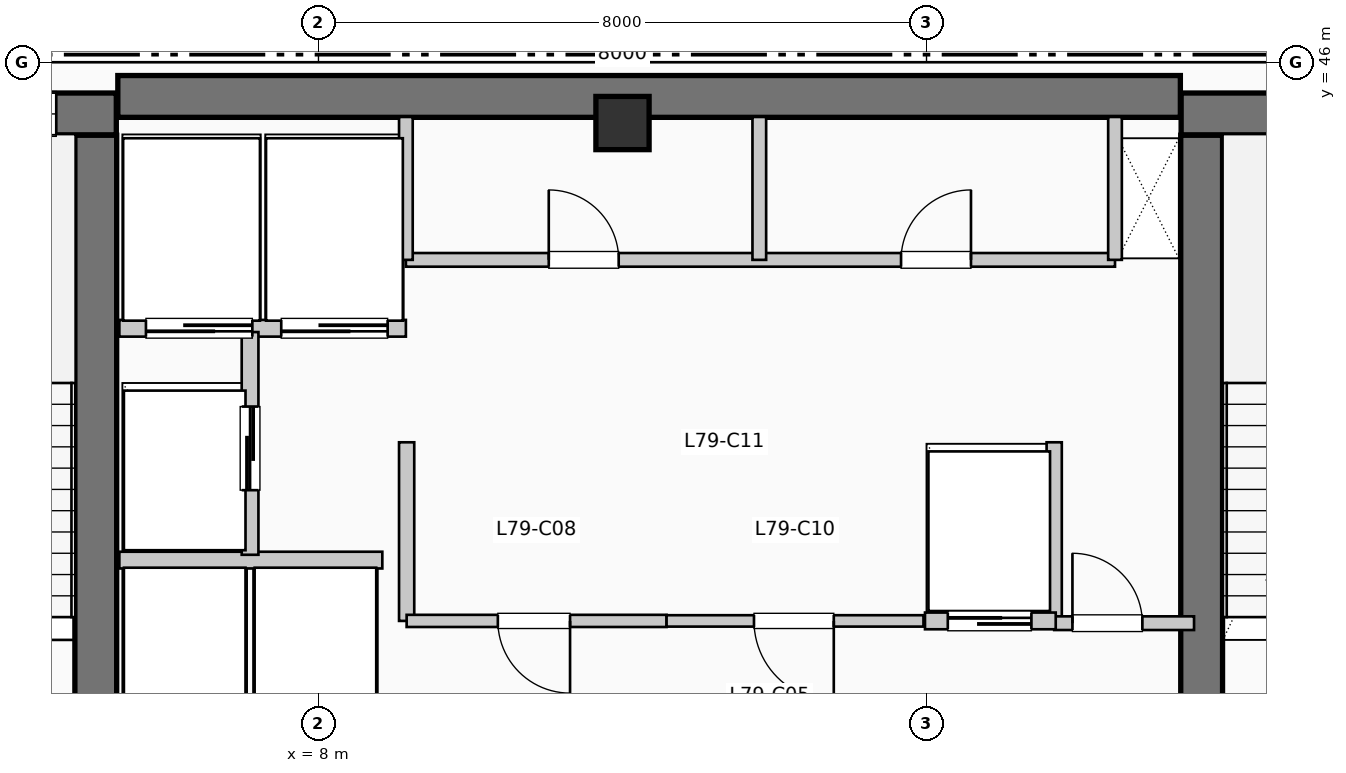
"""IFC4 building model, lengths in metres.
Left out: names, types, materials, properties, quantities, classifications, styles, units other than length and angle.
Written with IfcOpenShell. Run it as: python <this file> out.ifc"""

import sys

from ifc_helpers import new_model, si_unit, direction, frame, frame_2d, origin, origin_2d, place, context, subcontext, project, spatial, rectangle, extrude, element, fill, save


model = new_model("IFC4")
c1 = context("Model", 3, precision=1e-05, world=origin(), true_north=direction((0.0, 1.0)))
c2 = subcontext(c1, "Body", "Model", "MODEL_VIEW")
j1 = project(units=[si_unit("LENGTHUNIT", "METRE"), si_unit("PLANEANGLEUNIT", "RADIAN")], contexts=[c1])
p1 = place(None, origin())
s1 = spatial("IfcSite", under=j1, at=p1, CompositionType="ELEMENT")
p2 = place(p1, origin())
s2 = spatial("IfcBuilding", under=s1, at=p2, CompositionType="ELEMENT")
p3 = place(p2, frame((0.0, 0.0, 323.73)))
s3 = spatial("IfcBuildingStorey", under=s2, at=p3, CompositionType="ELEMENT", Elevation=323.73)
p4 = place(p3, frame((5.36, 45.55, 0.0), z_axis=(0.0, 0.0, 1.0), x_axis=(1.0, 0.0, 0.0)))
e1 = element("IfcWall", 1, at=p4, inside=s3, PredefinedType="SHEAR", context=c2, shape_type="SweptSolid", body=[
    extrude(rectangle(XDim=13.98, YDim=0.55, at=frame_2d((6.99, 0.0))), origin(), (0.0, 0.0, 1.0), 3.96),
])
p5 = place(p3, frame((5.07, 37.15, 0.0), z_axis=(0.0, 0.0, 1.0), x_axis=(0.0, 1.0, 0.0)))
e2 = element("IfcWall", 2, at=p5, inside=s3, PredefinedType="SHEAR", context=c2, shape_type="SweptSolid", body=[
    extrude(rectangle(XDim=7.89, YDim=0.55, at=frame_2d((3.945, 0.0))), origin(), (0.0, 0.0, 1.0), 3.96),
])
p6 = place(p3, frame((1.1, 45.32, 0.0), z_axis=(0.0, 0.0, 1.0), x_axis=(1.0, 0.0, 0.0)))
e3 = element("IfcWall", 3, at=p6, inside=s3, PredefinedType="SHEAR", context=c2, shape_type="SweptSolid", body=[
    extrude(rectangle(XDim=4.24, YDim=0.55, at=frame_2d((2.12, 0.0))), origin(), (0.0, 0.0, 1.0), 3.96),
])
p7 = place(p6, frame((2.05, 0.0, 1.05)))
e4 = element("IfcOpeningElement", 4, at=p7, cuts=e3, PredefinedType="OPENING", context=c2, shape_type="SweptSolid", body=[
    extrude(rectangle(XDim=1.4, YDim=1.8, at=frame_2d((0.7, 0.9))), frame((0.0, 0.285, 0.0), z_axis=(0.0, -1.0, 0.0), x_axis=(1.0, 0.0, 0.0)), (0.0, 0.0, 1.0), 0.57),
])
p8 = place(p3, frame((19.62, 37.15, 0.0), z_axis=(0.0, 0.0, 1.0), x_axis=(0.0, 1.0, 0.0)))
e5 = element("IfcWall", 5, at=p8, inside=s3, PredefinedType="SHEAR", context=c2, shape_type="SweptSolid", body=[
    extrude(rectangle(XDim=7.89, YDim=0.55, at=frame_2d((3.945, 0.0))), origin(), (0.0, 0.0, 1.0), 3.96),
])
p9 = place(p3, frame((19.35, 45.32, 0.0), z_axis=(0.0, 0.0, 1.0), x_axis=(1.0, 0.0, 0.0)))
e6 = element("IfcWall", 6, at=p9, inside=s3, PredefinedType="SHEAR", context=c2, shape_type="SweptSolid", body=[
    extrude(rectangle(XDim=3.69, YDim=0.55, at=frame_2d((1.845, 0.0))), origin(), (0.0, 0.0, 1.0), 3.96),
])
p10 = place(p9, frame((1.15, 0.0, 1.05)))
e7 = element("IfcOpeningElement", 7, at=p10, cuts=e6, PredefinedType="OPENING", context=c2, shape_type="SweptSolid", body=[
    extrude(rectangle(XDim=1.4, YDim=1.8, at=frame_2d((0.7, 0.9))), frame((0.0, 0.285, 0.0), z_axis=(0.0, -1.0, 0.0), x_axis=(1.0, 0.0, 0.0)), (0.0, 0.0, 1.0), 0.57),
])
p11 = place(p3, frame((12.0, 45.2, 0.0), z_axis=(0.0, 0.0, 1.0), x_axis=(1.0, 0.0, 0.0)))
e8 = element("IfcColumn", 8, at=p11, inside=s3, PredefinedType="COLUMN", context=c2, shape_type="SweptSolid", body=[
    extrude(rectangle(XDim=0.7, YDim=0.7, at=origin_2d()), origin(), (0.0, 0.0, 1.0), 3.96),
])
p12 = place(p3, frame((5.38, 39.45, 0.0), z_axis=(0.0, 0.0, 1.0), x_axis=(1.0, 0.0, 0.0)))
e9 = element("IfcWall", 9, at=p12, inside=s3, PredefinedType="PARTITIONING", context=c2, shape_type="SweptSolid", body=[
    extrude(rectangle(XDim=3.46, YDim=0.22, at=frame_2d((1.73, 0.0))), origin(), (0.0, 0.0, 1.0), 3.74),
])
p13 = place(p3, frame((5.38, 42.5, 0.0), z_axis=(0.0, 0.0, 1.0), x_axis=(1.0, 0.0, 0.0)))
e10 = element("IfcWall", 10, at=p13, inside=s3, PredefinedType="PARTITIONING", context=c2, shape_type="SweptSolid", body=[
    extrude(rectangle(XDim=3.77, YDim=0.22, at=frame_2d((1.885, 0.0))), origin(), (0.0, 0.0, 1.0), 3.74),
])
p14 = place(p13, frame((1.75, 0.0, 0.0), z_axis=(0.0, 0.0, 1.0), x_axis=(-1.0, 0.0, 0.0)))
e11 = element("IfcOpeningElement", 11, at=p14, cuts=e10, PredefinedType="OPENING", context=c2, shape_type="SweptSolid", body=[
    extrude(rectangle(XDim=1.4, YDim=2.2, at=frame_2d((0.7, 1.1))), frame((0.0, 0.12, 0.0), z_axis=(0.0, -1.0, 0.0), x_axis=(1.0, 0.0, 0.0)), (0.0, 0.0, 1.0), 0.24),
])
p15 = place(p13, frame((3.53, 0.0, 0.0), z_axis=(0.0, 0.0, 1.0), x_axis=(-1.0, 0.0, 0.0)))
e12 = element("IfcOpeningElement", 12, at=p15, cuts=e10, PredefinedType="OPENING", context=c2, shape_type="SweptSolid", body=[
    extrude(rectangle(XDim=1.4, YDim=2.2, at=frame_2d((0.7, 1.1))), frame((0.0, 0.12, 0.0), z_axis=(0.0, -1.0, 0.0), x_axis=(1.0, 0.0, 0.0)), (0.0, 0.0, 1.0), 0.24),
])
p16 = place(p3, frame((7.1, 39.52, 0.0), z_axis=(0.0, 0.0, 1.0), x_axis=(0.0, 1.0, 0.0)))
e13 = element("IfcWall", 13, at=p16, inside=s3, PredefinedType="PARTITIONING", context=c2, shape_type="SweptSolid", body=[
    extrude(rectangle(XDim=2.93, YDim=0.22, at=frame_2d((1.465, 0.0))), origin(), (0.0, 0.0, 1.0), 3.74),
])
p17 = place(p16, frame((0.85, 0.0, 0.0)))
e14 = element("IfcOpeningElement", 14, at=p17, cuts=e13, PredefinedType="OPENING", context=c2, shape_type="SweptSolid", body=[
    extrude(rectangle(XDim=1.1, YDim=2.2, at=frame_2d((0.55, 1.1))), frame((0.0, 0.12, 0.0), z_axis=(0.0, -1.0, 0.0), x_axis=(1.0, 0.0, 0.0)), (0.0, 0.0, 1.0), 0.24),
])
for number, where, z_axis, x_axis in (
    (15, (9.16, 38.65, 0.0), (0.0, 0.0, 1.0), (0.0, 1.0, 0.0)),
    (16, (17.68, 38.65, 0.0), (0.0, 0.0, 1.0), (0.0, 1.0, 0.0)),
):
    element("IfcWall", number, at=place(p3, frame(where, z_axis=z_axis, x_axis=x_axis)), inside=s3, PredefinedType="PARTITIONING", context=c2, shape_type="SweptSolid", body=[
        extrude(rectangle(XDim=2.35, YDim=0.2, at=frame_2d((1.175, 0.0))), origin(), (0.0, 0.0, 1.0), 3.74),
    ])
p18 = place(p3, frame((17.68, 38.62, 0.0), z_axis=(0.0, 0.0, 1.0), x_axis=(1.0, 0.0, 0.0)))
e17 = element("IfcWall", 17, at=p18, inside=s3, PredefinedType="PARTITIONING", context=c2, shape_type="SweptSolid", body=[
    extrude(rectangle(XDim=1.84, YDim=0.18, at=frame_2d((0.92, 0.0))), origin(), (0.0, 0.0, 1.0), 3.74),
])
p19 = place(p18, frame((0.24, 0.0, 0.0)))
e18 = element("IfcOpeningElement", 18, at=p19, cuts=e17, PredefinedType="OPENING", context=c2, shape_type="SweptSolid", body=[
    extrude(rectangle(XDim=0.92, YDim=2.1, at=frame_2d((0.46, 1.05))), frame((0.0, 0.1, 0.0), z_axis=(0.0, -1.0, 0.0), x_axis=(1.0, 0.0, 0.0)), (0.0, 0.0, 1.0), 0.2),
])
p20 = place(p3, frame((9.16, 38.65, 0.0), z_axis=(0.0, 0.0, 1.0), x_axis=(1.0, 0.0, 0.0)))
e19 = element("IfcWall", 19, at=p20, inside=s3, PredefinedType="PARTITIONING", context=c2, shape_type="SweptSolid", body=[
    extrude(rectangle(XDim=3.42, YDim=0.16, at=frame_2d((1.71, 0.0))), origin(), (0.0, 0.0, 1.0), 3.74),
])
p21 = place(p20, frame((2.15, 0.0, 0.0), z_axis=(0.0, 0.0, 1.0), x_axis=(-1.0, 0.0, 0.0)))
e20 = element("IfcOpeningElement", 20, at=p21, cuts=e19, PredefinedType="OPENING", context=c2, shape_type="SweptSolid", body=[
    extrude(rectangle(XDim=0.95, YDim=2.15, at=frame_2d((0.475, 1.075))), frame((0.0, 0.09, 0.0), z_axis=(0.0, -1.0, 0.0), x_axis=(1.0, 0.0, 0.0)), (0.0, 0.0, 1.0), 0.18),
])
p22 = place(p3, frame((12.58, 38.65, 0.0), z_axis=(0.0, 0.0, 1.0), x_axis=(1.0, 0.0, 0.0)))
e21 = element("IfcWall", 21, at=p22, inside=s3, PredefinedType="PARTITIONING", context=c2, shape_type="SweptSolid", body=[
    extrude(rectangle(XDim=3.38, YDim=0.15, at=frame_2d((1.69, 0.0))), origin(), (0.0, 0.0, 1.0), 3.74),
])
p23 = place(p22, frame((2.2, 0.0, 0.0), z_axis=(0.0, 0.0, 1.0), x_axis=(-1.0, 0.0, 0.0)))
e22 = element("IfcOpeningElement", 22, at=p23, cuts=e21, PredefinedType="OPENING", context=c2, shape_type="SweptSolid", body=[
    extrude(rectangle(XDim=1.05, YDim=2.15, at=frame_2d((0.525, 1.075))), frame((0.0, 0.085, 0.0), z_axis=(0.0, -1.0, 0.0), x_axis=(1.0, 0.0, 0.0)), (0.0, 0.0, 1.0), 0.17),
])
p24 = place(p3, frame((15.98, 38.65, 0.0), z_axis=(0.0, 0.0, 1.0), x_axis=(1.0, 0.0, 0.0)))
e23 = element("IfcWall", 23, at=p24, inside=s3, PredefinedType="PARTITIONING", context=c2, shape_type="SweptSolid", body=[
    extrude(rectangle(XDim=1.72, YDim=0.22, at=frame_2d((0.86, 0.0))), origin(), (0.0, 0.0, 1.0), 3.74),
])
p25 = place(p24, frame((0.3, 0.0, 0.0)))
e24 = element("IfcOpeningElement", 24, at=p25, cuts=e23, PredefinedType="OPENING", context=c2, shape_type="SweptSolid", body=[
    extrude(rectangle(XDim=1.1, YDim=2.2, at=frame_2d((0.55, 1.1))), frame((0.0, 0.12, 0.0), z_axis=(0.0, -1.0, 0.0), x_axis=(1.0, 0.0, 0.0)), (0.0, 0.0, 1.0), 0.24),
])
p26 = place(p3, frame((9.15, 43.4, 0.0), z_axis=(0.0, 0.0, 1.0), x_axis=(1.0, 0.0, 0.0)))
e25 = element("IfcWall", 25, at=p26, inside=s3, PredefinedType="PLUMBINGWALL", context=c2, shape_type="SweptSolid", body=[
    extrude(rectangle(XDim=9.33, YDim=0.18, at=frame_2d((4.665, 0.0))), origin(), (0.0, 0.0, 1.0), 3.74),
])
p27 = place(p26, frame((1.88, 0.0, 0.0)))
e26 = element("IfcOpeningElement", 26, at=p27, cuts=e25, PredefinedType="OPENING", context=c2, shape_type="SweptSolid", body=[
    extrude(rectangle(XDim=0.92, YDim=2.1, at=frame_2d((0.46, 1.05))), frame((0.0, 0.1, 0.0), z_axis=(0.0, -1.0, 0.0), x_axis=(1.0, 0.0, 0.0)), (0.0, 0.0, 1.0), 0.2),
])
p28 = place(p26, frame((6.515, 0.0, 0.0)))
e27 = element("IfcOpeningElement", 27, at=p28, cuts=e25, PredefinedType="OPENING", context=c2, shape_type="SweptSolid", body=[
    extrude(rectangle(XDim=0.92, YDim=2.1, at=frame_2d((0.46, 1.05))), frame((0.0, 0.1, 0.0), z_axis=(0.0, -1.0, 0.0), x_axis=(1.0, 0.0, 0.0)), (0.0, 0.0, 1.0), 0.2),
])
for number, where, z_axis, x_axis in (
    (28, (9.15, 43.4, 0.0), (0.0, 0.0, 1.0), (0.0, 1.0, 0.0)),
    (29, (18.48, 43.4, 0.0), (0.0, 0.0, 1.0), (0.0, 1.0, 0.0)),
    (30, (13.8, 43.4, 0.0), (0.0, 0.0, 1.0), (0.0, 1.0, 0.0)),
):
    element("IfcWall", number, at=place(p3, frame(where, z_axis=z_axis, x_axis=x_axis)), inside=s3, PredefinedType="PLUMBINGWALL", context=c2, shape_type="SweptSolid", body=[
        extrude(rectangle(XDim=1.88, YDim=0.18, at=frame_2d((0.94, 0.0))), origin(), (0.0, 0.0, 1.0), 3.74),
    ])
p29 = place(p7, origin())
e31 = element("IfcWindow", 31, at=p29, inside=s3, PartitioningType="SINGLE_PANEL", PredefinedType="WINDOW", context=c2, shape_type="SweptSolid", body=[
    extrude(rectangle(XDim=1.4, YDim=1.8, at=frame_2d((0.7, 0.9))), frame((0.0, 0.03, 0.0), z_axis=(0.0, -1.0, 0.0), x_axis=(1.0, 0.0, 0.0)), (0.0, 0.0, 1.0), 0.06),
])
fill(e4, e31)
p30 = place(p14, origin())
e32 = element("IfcDoor", 32, at=p30, inside=s3, OperationType="SLIDING_TO_LEFT", PredefinedType="DOOR", context=c2, shape_type="SweptSolid", body=[
    extrude(rectangle(XDim=1.4, YDim=2.2, at=frame_2d((0.7, 1.1))), frame((0.0, 0.025, 0.0), z_axis=(0.0, -1.0, 0.0), x_axis=(1.0, 0.0, 0.0)), (0.0, 0.0, 1.0), 0.05),
])
fill(e11, e32)
p31 = place(p15, origin())
e33 = element("IfcDoor", 33, at=p31, inside=s3, OperationType="SLIDING_TO_LEFT", PredefinedType="DOOR", context=c2, shape_type="SweptSolid", body=[
    extrude(rectangle(XDim=1.4, YDim=2.2, at=frame_2d((0.7, 1.1))), frame((0.0, 0.025, 0.0), z_axis=(0.0, -1.0, 0.0), x_axis=(1.0, 0.0, 0.0)), (0.0, 0.0, 1.0), 0.05),
])
fill(e12, e33)
p32 = place(p17, origin())
e34 = element("IfcDoor", 34, at=p32, inside=s3, OperationType="SLIDING_TO_LEFT", PredefinedType="DOOR", context=c2, shape_type="SweptSolid", body=[
    extrude(rectangle(XDim=1.1, YDim=2.2, at=frame_2d((0.55, 1.1))), frame((0.0, 0.025, 0.0), z_axis=(0.0, -1.0, 0.0), x_axis=(1.0, 0.0, 0.0)), (0.0, 0.0, 1.0), 0.05),
])
fill(e14, e34)
p33 = place(p19, origin())
e35 = element("IfcDoor", 35, at=p33, inside=s3, OperationType="SINGLE_SWING_LEFT", PredefinedType="DOOR", context=c2, shape_type="SweptSolid", body=[
    extrude(rectangle(XDim=0.92, YDim=2.1, at=frame_2d((0.46, 1.05))), frame((0.0, 0.025, 0.0), z_axis=(0.0, -1.0, 0.0), x_axis=(1.0, 0.0, 0.0)), (0.0, 0.0, 1.0), 0.05),
])
fill(e18, e35)
p34 = place(p21, origin())
e36 = element("IfcDoor", 36, at=p34, inside=s3, OperationType="SINGLE_SWING_RIGHT", PredefinedType="DOOR", context=c2, shape_type="SweptSolid", body=[
    extrude(rectangle(XDim=0.95, YDim=2.15, at=frame_2d((0.475, 1.075))), frame((0.0, 0.025, 0.0), z_axis=(0.0, -1.0, 0.0), x_axis=(1.0, 0.0, 0.0)), (0.0, 0.0, 1.0), 0.05),
])
fill(e20, e36)
p35 = place(p23, origin())
e37 = element("IfcDoor", 37, at=p35, inside=s3, OperationType="SINGLE_SWING_RIGHT", PredefinedType="DOOR", context=c2, shape_type="SweptSolid", body=[
    extrude(rectangle(XDim=1.05, YDim=2.15, at=frame_2d((0.525, 1.075))), frame((0.0, 0.025, 0.0), z_axis=(0.0, -1.0, 0.0), x_axis=(1.0, 0.0, 0.0)), (0.0, 0.0, 1.0), 0.05),
])
fill(e22, e37)
p36 = place(p25, origin())
e38 = element("IfcDoor", 38, at=p36, inside=s3, OperationType="SLIDING_TO_LEFT", PredefinedType="DOOR", context=c2, shape_type="SweptSolid", body=[
    extrude(rectangle(XDim=1.1, YDim=2.2, at=frame_2d((0.55, 1.1))), frame((0.0, 0.025, 0.0), z_axis=(0.0, -1.0, 0.0), x_axis=(1.0, 0.0, 0.0)), (0.0, 0.0, 1.0), 0.05),
])
fill(e24, e38)
p37 = place(p27, origin())
e39 = element("IfcDoor", 39, at=p37, inside=s3, OperationType="SINGLE_SWING_LEFT", PredefinedType="DOOR", context=c2, shape_type="SweptSolid", body=[
    extrude(rectangle(XDim=0.92, YDim=2.1, at=frame_2d((0.46, 1.05))), frame((0.0, 0.025, 0.0), z_axis=(0.0, -1.0, 0.0), x_axis=(1.0, 0.0, 0.0)), (0.0, 0.0, 1.0), 0.05),
])
fill(e26, e39)
p38 = place(p28, origin())
e40 = element("IfcDoor", 40, at=p38, inside=s3, OperationType="SINGLE_SWING_RIGHT", PredefinedType="DOOR", context=c2, shape_type="SweptSolid", body=[
    extrude(rectangle(XDim=0.92, YDim=2.1, at=frame_2d((0.46, 1.05))), frame((0.0, 0.025, 0.0), z_axis=(0.0, -1.0, 0.0), x_axis=(1.0, 0.0, 0.0)), (0.0, 0.0, 1.0), 0.05),
])
fill(e27, e40)
save(model, sys.argv[1])
